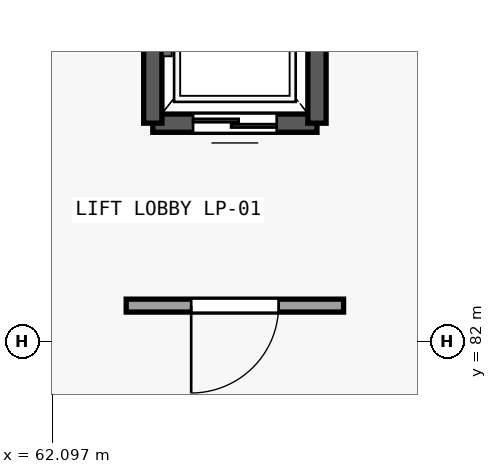
"""IFC4 building model, lengths in metres.
Left out: names, types, materials, properties, quantities, classifications, styles, units other than length and angle.
Written with IfcOpenShell. Run it as: python <this file> out.ifc"""

import sys

from ifc_helpers import new_model, si_unit, direction, frame, frame_2d, origin, place, context, subcontext, project, spatial, rectangle, extrude, element, fill, save


model = new_model("IFC4")
c1 = context("Model", 3, precision=1e-05, world=origin(), true_north=direction((0.0, 1.0)))
c2 = subcontext(c1, "Body", "Model", "MODEL_VIEW")
j1 = project(units=[si_unit("LENGTHUNIT", "METRE"), si_unit("PLANEANGLEUNIT", "RADIAN")], contexts=[c1])
p1 = place(None, origin())
s1 = spatial("IfcSite", under=j1, at=p1, CompositionType="ELEMENT")
p2 = place(p1, origin())
s2 = spatial("IfcBuilding", under=s1, at=p2, CompositionType="ELEMENT")
p3 = place(p2, frame((0.0, 0.0, 5.4)))
s3 = spatial("IfcBuildingStorey", under=s2, at=p3, CompositionType="ELEMENT", Elevation=5.4)
p4 = place(p3, frame((65.58, 84.87, 0.0), z_axis=(0.0, 0.0, 1.0), x_axis=(-1.0, 0.0, 0.0)))
e1 = element("IfcWall", 1, at=p4, inside=s3, PredefinedType="SOLIDWALL", context=c2, shape_type="SweptSolid", body=[
    extrude(rectangle(XDim=2.16, YDim=0.24, at=frame_2d((1.08, 0.0))), origin(), (0.0, 0.0, 1.0), 3.64),
])
p5 = place(p4, frame((0.53, 0.0, 0.0)))
e2 = element("IfcOpeningElement", 2, at=p5, cuts=e1, PredefinedType="OPENING", context=c2, shape_type="SweptSolid", body=[
    extrude(rectangle(XDim=1.1, YDim=2.15, at=frame_2d((0.55, 1.075))), frame((0.0, 0.13, 0.0), z_axis=(0.0, -1.0, 0.0), x_axis=(1.0, 0.0, 0.0)), (0.0, 0.0, 1.0), 0.26),
])
for number, where, z_axis, x_axis in (
    (3, (63.42, 84.87, 0.0), (0.0, 0.0, 1.0), (0.0, 1.0, 0.0)),
    (4, (65.58, 87.53, 0.0), (0.0, 0.0, 1.0), (0.0, -1.0, 0.0)),
):
    element("IfcWall", number, at=place(p3, frame(where, z_axis=z_axis, x_axis=x_axis)), inside=s3, PredefinedType="SOLIDWALL", context=c2, shape_type="SweptSolid", body=[
        extrude(rectangle(XDim=2.66, YDim=0.24, at=frame_2d((1.33, 0.0))), origin(), (0.0, 0.0, 1.0), 3.64),
    ])
p6 = place(p3, frame((65.93, 82.47, 0.0), z_axis=(0.0, 0.0, 1.0), x_axis=(-1.0, 0.0, 0.0)))
e5 = element("IfcWall", 5, at=p6, inside=s3, PredefinedType="PARTITIONING", context=c2, shape_type="SweptSolid", body=[
    extrude(rectangle(XDim=2.86, YDim=0.17, at=frame_2d((1.43, 0.0))), origin(), (0.0, 0.0, 1.0), 3.64),
])
p7 = place(p6, frame((0.855, 0.0, 0.0)))
e6 = element("IfcOpeningElement", 6, at=p7, cuts=e5, PredefinedType="OPENING", context=c2, shape_type="SweptSolid", body=[
    extrude(rectangle(XDim=1.15, YDim=2.15, at=frame_2d((0.575, 1.075))), frame((0.0, 0.095, 0.0), z_axis=(0.0, -1.0, 0.0), x_axis=(1.0, 0.0, 0.0)), (0.0, 0.0, 1.0), 0.19),
])
p8 = place(p5, origin())
e7 = element("IfcDoor", 7, at=p8, inside=s3, OperationType="DOUBLE_DOOR_SLIDING", PredefinedType="DOOR", context=c2, shape_type="SweptSolid", body=[
    extrude(rectangle(XDim=1.1, YDim=2.15, at=frame_2d((0.55, 1.075))), frame((0.0, 0.025, 0.0), z_axis=(0.0, -1.0, 0.0), x_axis=(1.0, 0.0, 0.0)), (0.0, 0.0, 1.0), 0.05),
])
fill(e2, e7)
p9 = place(p7, origin())
e8 = element("IfcDoor", 8, at=p9, inside=s3, OperationType="SINGLE_SWING_RIGHT", PredefinedType="DOOR", context=c2, shape_type="SweptSolid", body=[
    extrude(rectangle(XDim=1.15, YDim=2.15, at=frame_2d((0.575, 1.075))), frame((0.0, 0.025, 0.0), z_axis=(0.0, -1.0, 0.0), x_axis=(1.0, 0.0, 0.0)), (0.0, 0.0, 1.0), 0.05),
])
fill(e6, e8)
save(model, sys.argv[1])
